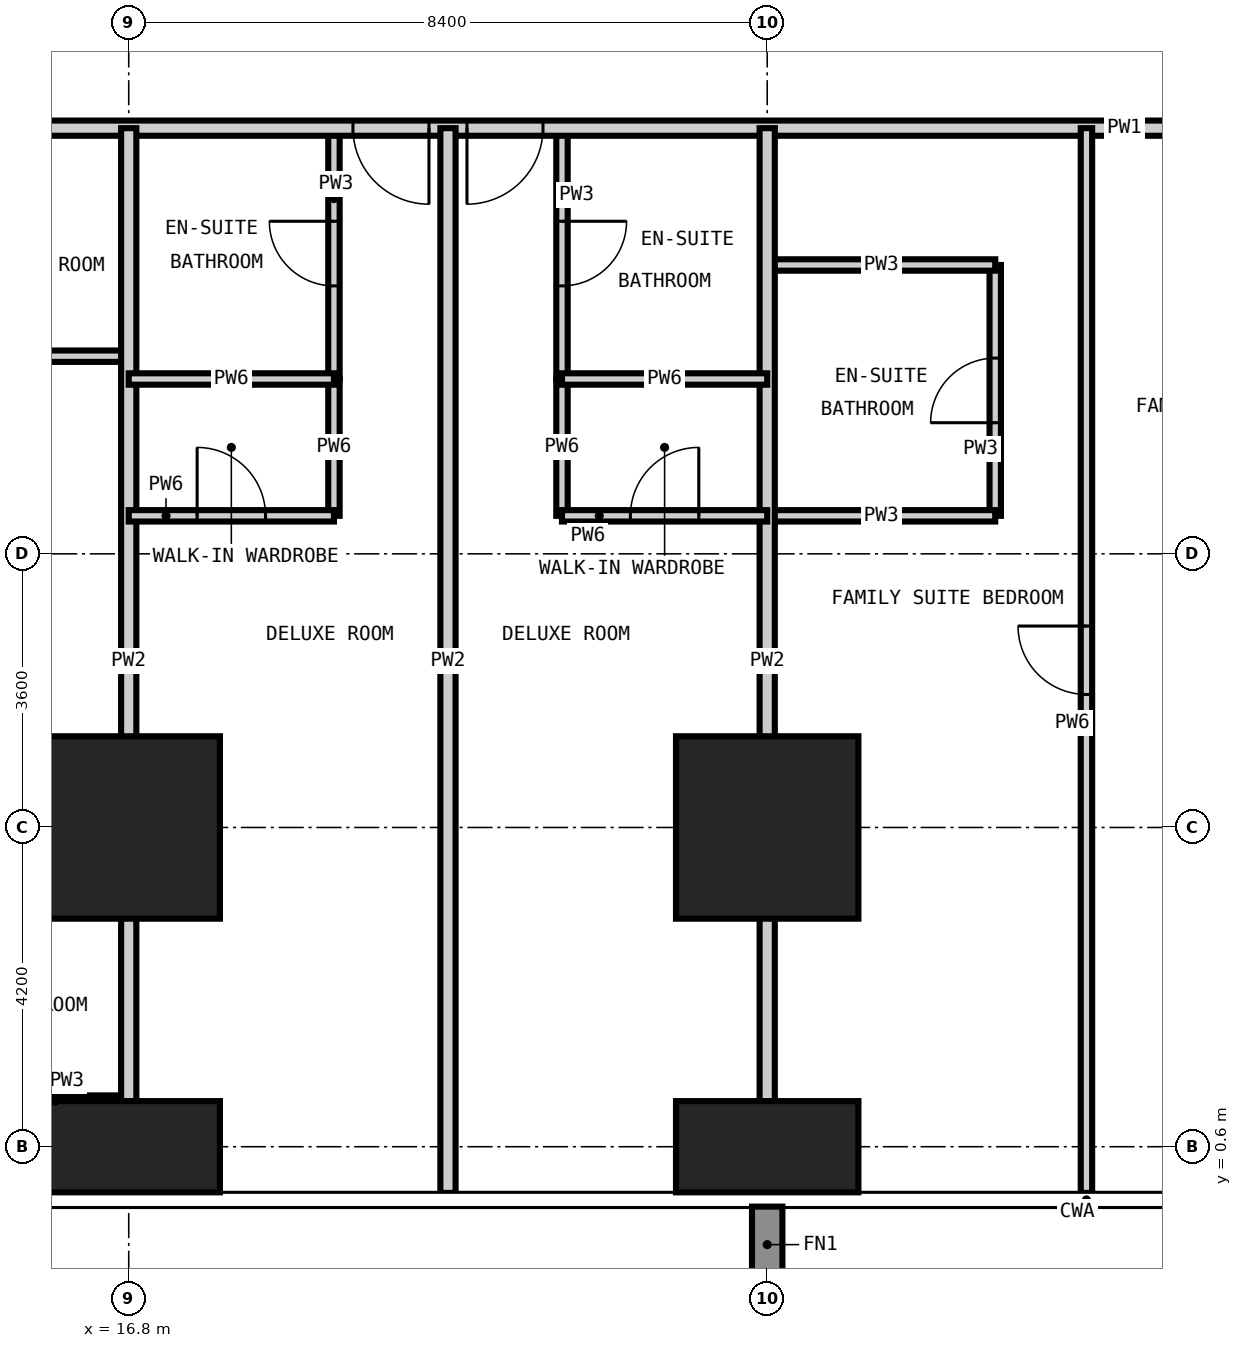
"""IFC4 building model, lengths in metres.
Left out: names, types, materials, properties, quantities, classifications, styles, units other than length and angle.
Written with IfcOpenShell. Run it as: python <this file> out.ifc"""

import sys

from ifc_helpers import new_model, si_unit, direction, frame, frame_2d, origin, origin_2d, place, context, subcontext, project, spatial, rectangle, extrude, element, fill, save


model = new_model("IFC4")
c1 = context("Model", 3, precision=1e-05, world=origin(), true_north=direction((0.0, 1.0)))
c2 = subcontext(c1, "Body", "Model", "MODEL_VIEW")
j1 = project(units=[si_unit("LENGTHUNIT", "METRE"), si_unit("PLANEANGLEUNIT", "RADIAN")], contexts=[c1])
p1 = place(None, origin())
s1 = spatial("IfcSite", under=j1, at=p1, CompositionType="ELEMENT")
p2 = place(p1, origin())
s2 = spatial("IfcBuilding", under=s1, at=p2, CompositionType="ELEMENT")
p3 = place(p2, frame((0.0, 0.0, 81.0)))
s3 = spatial("IfcBuildingStorey", under=s2, at=p3, CompositionType="ELEMENT", Elevation=81.0)
p4 = place(p3, frame((16.8, 0.6, -0.35), z_axis=(0.0, 0.0, 1.0), x_axis=(1.0, 0.0, 0.0)))
e1 = element("IfcColumn", 1, at=p4, inside=s3, PredefinedType="COLUMN", context=c2, shape_type="SweptSolid", body=[
    extrude(rectangle(XDim=2.4, YDim=1.2, at=origin_2d()), origin(), (0.0, 0.0, 1.0), 3.6),
])
p5 = place(p3, frame((16.8, 4.8, -0.35), z_axis=(0.0, 0.0, 1.0), x_axis=(1.0, 0.0, 0.0)))
e2 = element("IfcColumn", 2, at=p5, inside=s3, PredefinedType="COLUMN", context=c2, shape_type="SweptSolid", body=[
    extrude(rectangle(XDim=2.4, YDim=2.4, at=origin_2d()), origin(), (0.0, 0.0, 1.0), 3.6),
])
p6 = place(p3, frame((25.2, 0.6, -0.35), z_axis=(0.0, 0.0, 1.0), x_axis=(1.0, 0.0, 0.0)))
e3 = element("IfcColumn", 3, at=p6, inside=s3, PredefinedType="COLUMN", context=c2, shape_type="SweptSolid", body=[
    extrude(rectangle(XDim=2.4, YDim=1.2, at=origin_2d()), origin(), (0.0, 0.0, 1.0), 3.6),
])
p7 = place(p3, frame((25.2, 4.8, -0.35), z_axis=(0.0, 0.0, 1.0), x_axis=(1.0, 0.0, 0.0)))
e4 = element("IfcColumn", 4, at=p7, inside=s3, PredefinedType="COLUMN", context=c2, shape_type="SweptSolid", body=[
    extrude(rectangle(XDim=2.4, YDim=2.4, at=origin_2d()), origin(), (0.0, 0.0, 1.0), 3.6),
])
p8 = place(p3, frame((19.5, 10.7, 0.0), z_axis=(0.0, 0.0, 1.0), x_axis=(0.0, 1.0, 0.0)))
e5 = element("IfcWall", 5, at=p8, inside=s3, PredefinedType="PARTITIONING", context=c2, shape_type="SweptSolid", body=[
    extrude(rectangle(XDim=3.3, YDim=0.15, at=frame_2d((1.65, 0.0))), origin(), (0.0, 0.0, 1.0), 3.25),
])
p9 = place(p8, frame((1.225, 0.0, 0.0)))
e6 = element("IfcOpeningElement", 6, at=p9, cuts=e5, PredefinedType="OPENING", context=c2, shape_type="SweptSolid", body=[
    extrude(rectangle(XDim=0.85, YDim=2.1, at=frame_2d((0.425, 1.05))), frame((0.0, 0.085, 0.0), z_axis=(0.0, -1.0, 0.0), x_axis=(1.0, 0.0, 0.0)), (0.0, 0.0, 1.0), 0.17),
])
p10 = place(p3, frame((22.5, 10.7, 0.0), z_axis=(0.0, 0.0, 1.0), x_axis=(0.0, 1.0, 0.0)))
e7 = element("IfcWall", 7, at=p10, inside=s3, PredefinedType="PARTITIONING", context=c2, shape_type="SweptSolid", body=[
    extrude(rectangle(XDim=3.3, YDim=0.15, at=frame_2d((1.65, 0.0))), origin(), (0.0, 0.0, 1.0), 3.25),
])
p11 = place(p10, frame((1.225, 0.0, 0.0)))
e8 = element("IfcOpeningElement", 8, at=p11, cuts=e7, PredefinedType="OPENING", context=c2, shape_type="SweptSolid", body=[
    extrude(rectangle(XDim=0.85, YDim=2.1, at=frame_2d((0.425, 1.05))), frame((0.0, 0.085, 0.0), z_axis=(0.0, -1.0, 0.0), x_axis=(1.0, 0.0, 0.0)), (0.0, 0.0, 1.0), 0.17),
])
p12 = place(p3, frame((28.2, 8.9, 0.0), z_axis=(0.0, 0.0, 1.0), x_axis=(0.0, 1.0, 0.0)))
e9 = element("IfcWall", 9, at=p12, inside=s3, PredefinedType="PARTITIONING", context=c2, shape_type="SweptSolid", body=[
    extrude(rectangle(XDim=3.3, YDim=0.15, at=frame_2d((1.65, 0.0))), origin(), (0.0, 0.0, 1.0), 3.25),
])
p13 = place(p12, frame((1.225, 0.0, 0.0)))
e10 = element("IfcOpeningElement", 10, at=p13, cuts=e9, PredefinedType="OPENING", context=c2, shape_type="SweptSolid", body=[
    extrude(rectangle(XDim=0.85, YDim=2.1, at=frame_2d((0.425, 1.05))), frame((0.0, 0.085, 0.0), z_axis=(0.0, -1.0, 0.0), x_axis=(1.0, 0.0, 0.0)), (0.0, 0.0, 1.0), 0.17),
])
p14 = place(p3, frame((13.2, 1.2, 0.0), z_axis=(0.0, 0.0, 1.0), x_axis=(1.0, 0.0, 0.0)))
e11 = element("IfcWall", 11, at=p14, inside=s3, PredefinedType="PARTITIONING", context=c2, shape_type="SweptSolid", body=[
    extrude(rectangle(XDim=3.6, YDim=0.15, at=frame_2d((1.8, 0.0))), origin(), (0.0, 0.0, 1.0), 3.25),
])
p15 = place(p14, frame((1.375, 0.0, 0.0)))
e12 = element("IfcOpeningElement", 12, at=p15, cuts=e11, PredefinedType="OPENING", context=c2, shape_type="SweptSolid", body=[
    extrude(rectangle(XDim=0.85, YDim=2.1, at=frame_2d((0.425, 1.05))), frame((0.0, 0.085, 0.0), z_axis=(0.0, -1.0, 0.0), x_axis=(1.0, 0.0, 0.0)), (0.0, 0.0, 1.0), 0.17),
])
p16 = place(p3, frame((25.2, 8.9, 0.0), z_axis=(0.0, 0.0, 1.0), x_axis=(1.0, 0.0, 0.0)))
e13 = element("IfcWall", 13, at=p16, inside=s3, PredefinedType="PARTITIONING", context=c2, shape_type="SweptSolid", body=[
    extrude(rectangle(XDim=3.0, YDim=0.15, at=frame_2d((1.5, 0.0))), origin(), (0.0, 0.0, 1.0), 3.25),
])
p17 = place(p3, frame((14.0, 11.0, 0.0), z_axis=(0.0, 0.0, 1.0), x_axis=(1.0, 0.0, 0.0)))
e14 = element("IfcWall", 14, at=p17, inside=s3, PredefinedType="PARTITIONING", context=c2, shape_type="SweptSolid", body=[
    extrude(rectangle(XDim=2.8, YDim=0.15, at=frame_2d((1.4, 0.0))), origin(), (0.0, 0.0, 1.0), 3.25),
])
p18 = place(p3, frame((25.2, 12.2, 0.0), z_axis=(0.0, 0.0, 1.0), x_axis=(1.0, 0.0, 0.0)))
e15 = element("IfcWall", 15, at=p18, inside=s3, PredefinedType="PARTITIONING", context=c2, shape_type="SweptSolid", body=[
    extrude(rectangle(XDim=3.0, YDim=0.15, at=frame_2d((1.5, 0.0))), origin(), (0.0, 0.0, 1.0), 3.25),
])
p19 = place(p3, frame((45.4, 14.0, 0.0), z_axis=(0.0, 0.0, 1.0), x_axis=(-1.0, 0.0, 0.0)))
e16 = element("IfcWall", 16, at=p19, inside=s3, PredefinedType="PARTITIONING", context=c2, shape_type="SweptSolid", body=[
    extrude(rectangle(XDim=31.4, YDim=0.2, at=frame_2d((15.7, 0.0))), origin(), (0.0, 0.0, 1.0), 3.25),
])
p20 = place(p19, frame((24.65, 0.0, 0.0)))
e17 = element("IfcOpeningElement", 17, at=p20, cuts=e16, PredefinedType="OPENING", context=c2, shape_type="SweptSolid", body=[
    extrude(rectangle(XDim=1.0, YDim=2.2, at=frame_2d((0.5, 1.1))), frame((0.0, 0.11, 0.0), z_axis=(0.0, -1.0, 0.0), x_axis=(1.0, 0.0, 0.0)), (0.0, 0.0, 1.0), 0.22),
])
p21 = place(p19, frame((23.15, 0.0, 0.0)))
e18 = element("IfcOpeningElement", 18, at=p21, cuts=e16, PredefinedType="OPENING", context=c2, shape_type="SweptSolid", body=[
    extrude(rectangle(XDim=1.0, YDim=2.2, at=frame_2d((0.5, 1.1))), frame((0.0, 0.11, 0.0), z_axis=(0.0, -1.0, 0.0), x_axis=(1.0, 0.0, 0.0)), (0.0, 0.0, 1.0), 0.22),
])
p22 = place(p19, frame((13.4, 0.0, 0.0)))
e19 = element("IfcOpeningElement", 19, at=p22, cuts=e16, PredefinedType="OPENING", context=c2, shape_type="SweptSolid", body=[
    extrude(rectangle(XDim=1.0, YDim=2.2, at=frame_2d((0.5, 1.1))), frame((0.0, 0.11, 0.0), z_axis=(0.0, -1.0, 0.0), x_axis=(1.0, 0.0, 0.0)), (0.0, 0.0, 1.0), 0.22),
])
p23 = place(p19, frame((6.35, 0.0, 0.0)))
e20 = element("IfcOpeningElement", 20, at=p23, cuts=e16, PredefinedType="OPENING", context=c2, shape_type="SweptSolid", body=[
    extrude(rectangle(XDim=1.0, YDim=2.2, at=frame_2d((0.5, 1.1))), frame((0.0, 0.11, 0.0), z_axis=(0.0, -1.0, 0.0), x_axis=(1.0, 0.0, 0.0)), (0.0, 0.0, 1.0), 0.22),
])
for number, where, z_axis, x_axis in (
    (21, (16.8, -0.008, 0.0), (0.0, 0.0, 1.0), (0.0, 1.0, 0.0)),
    (22, (21.0, -0.008, 0.0), (0.0, 0.0, 1.0), (0.0, 1.0, 0.0)),
    (23, (25.2, -0.008, 0.0), (0.0, 0.0, 1.0), (0.0, 1.0, 0.0)),
):
    element("IfcWall", number, at=place(p3, frame(where, z_axis=z_axis, x_axis=x_axis)), inside=s3, PredefinedType="PARTITIONING", context=c2, shape_type="SweptSolid", body=[
        extrude(rectangle(XDim=14.008, YDim=0.2, at=frame_2d((7.004, 0.0))), origin(), (0.0, 0.0, 1.0), 3.25),
    ])
for number, where, z_axis, x_axis in (
    (24, (19.5, 8.9, 0.0), (0.0, 0.0, 1.0), (0.0, 1.0, 0.0)),
    (25, (22.5, 8.9, 0.0), (0.0, 0.0, 1.0), (0.0, 1.0, 0.0)),
):
    element("IfcWall", number, at=place(p3, frame(where, z_axis=z_axis, x_axis=x_axis)), inside=s3, PredefinedType="PARTITIONING", context=c2, shape_type="SweptSolid", body=[
        extrude(rectangle(XDim=1.8, YDim=0.15, at=frame_2d((0.9, 0.0))), origin(), (0.0, 0.0, 1.0), 3.25),
    ])
p24 = place(p3, frame((29.4, -0.008, 0.0), z_axis=(0.0, 0.0, 1.0), x_axis=(0.0, 1.0, 0.0)))
e26 = element("IfcWall", 26, at=p24, inside=s3, PredefinedType="PARTITIONING", context=c2, shape_type="SweptSolid", body=[
    extrude(rectangle(XDim=14.008, YDim=0.15, at=frame_2d((7.004, 0.0))), origin(), (0.0, 0.0, 1.0), 3.25),
])
p25 = place(p24, frame((6.558, 0.0, 0.0)))
e27 = element("IfcOpeningElement", 27, at=p25, cuts=e26, PredefinedType="OPENING", context=c2, shape_type="SweptSolid", body=[
    extrude(rectangle(XDim=0.9, YDim=2.1, at=frame_2d((0.45, 1.05))), frame((0.0, 0.085, 0.0), z_axis=(0.0, -1.0, 0.0), x_axis=(1.0, 0.0, 0.0)), (0.0, 0.0, 1.0), 0.17),
])
p26 = place(p3, frame((-0.008, 4.2, 0.0), z_axis=(0.0, 0.0, 1.0), x_axis=(1.0, 0.0, 0.0)))
e28 = element("IfcWall", 28, at=p26, inside=s3, PredefinedType="PARTITIONING", context=c2, shape_type="SweptSolid", body=[
    extrude(rectangle(XDim=16.808, YDim=0.15, at=frame_2d((8.404, 0.0))), origin(), (0.0, 0.0, 1.0), 3.25),
])
p27 = place(p26, frame((4.958, 0.0, 0.0)))
e29 = element("IfcOpeningElement", 29, at=p27, cuts=e28, PredefinedType="OPENING", context=c2, shape_type="SweptSolid", body=[
    extrude(rectangle(XDim=0.9, YDim=2.1, at=frame_2d((0.45, 1.05))), frame((0.0, 0.085, 0.0), z_axis=(0.0, -1.0, 0.0), x_axis=(1.0, 0.0, 0.0)), (0.0, 0.0, 1.0), 0.17),
])
p28 = place(p3, frame((16.8, 8.9, 0.0), z_axis=(0.0, 0.0, 1.0), x_axis=(1.0, 0.0, 0.0)))
e30 = element("IfcWall", 30, at=p28, inside=s3, PredefinedType="PARTITIONING", context=c2, shape_type="SweptSolid", body=[
    extrude(rectangle(XDim=2.7, YDim=0.15, at=frame_2d((1.35, 0.0))), origin(), (0.0, 0.0, 1.0), 3.25),
])
p29 = place(p28, frame((0.9, 0.0, 0.0)))
e31 = element("IfcOpeningElement", 31, at=p29, cuts=e30, PredefinedType="OPENING", context=c2, shape_type="SweptSolid", body=[
    extrude(rectangle(XDim=0.9, YDim=2.1, at=frame_2d((0.45, 1.05))), frame((0.0, 0.085, 0.0), z_axis=(0.0, -1.0, 0.0), x_axis=(1.0, 0.0, 0.0)), (0.0, 0.0, 1.0), 0.17),
])
p30 = place(p3, frame((22.5, 8.9, 0.0), z_axis=(0.0, 0.0, 1.0), x_axis=(1.0, 0.0, 0.0)))
e32 = element("IfcWall", 32, at=p30, inside=s3, PredefinedType="PARTITIONING", context=c2, shape_type="SweptSolid", body=[
    extrude(rectangle(XDim=2.7, YDim=0.15, at=frame_2d((1.35, 0.0))), origin(), (0.0, 0.0, 1.0), 3.25),
])
p31 = place(p30, frame((0.9, 0.0, 0.0)))
e33 = element("IfcOpeningElement", 33, at=p31, cuts=e32, PredefinedType="OPENING", context=c2, shape_type="SweptSolid", body=[
    extrude(rectangle(XDim=0.9, YDim=2.1, at=frame_2d((0.45, 1.05))), frame((0.0, 0.085, 0.0), z_axis=(0.0, -1.0, 0.0), x_axis=(1.0, 0.0, 0.0)), (0.0, 0.0, 1.0), 0.17),
])
for number, where, z_axis, x_axis in (
    (34, (16.8, 10.7, 0.0), (0.0, 0.0, 1.0), (1.0, 0.0, 0.0)),
    (35, (22.5, 10.7, 0.0), (0.0, 0.0, 1.0), (1.0, 0.0, 0.0)),
):
    element("IfcWall", number, at=place(p3, frame(where, z_axis=z_axis, x_axis=x_axis)), inside=s3, PredefinedType="PARTITIONING", context=c2, shape_type="SweptSolid", body=[
        extrude(rectangle(XDim=2.7, YDim=0.15, at=frame_2d((1.35, 0.0))), origin(), (0.0, 0.0, 1.0), 3.25),
    ])
p32 = place(p20, origin())
e36 = element("IfcDoor", 36, at=p32, inside=s3, OperationType="SINGLE_SWING_LEFT", PredefinedType="DOOR", context=c2, shape_type="SweptSolid", body=[
    extrude(rectangle(XDim=1.0, YDim=2.2, at=frame_2d((0.5, 1.1))), frame((0.0, 0.025, 0.0), z_axis=(0.0, -1.0, 0.0), x_axis=(1.0, 0.0, 0.0)), (0.0, 0.0, 1.0), 0.05),
])
fill(e17, e36)
p33 = place(p9, origin())
e37 = element("IfcDoor", 37, at=p33, inside=s3, OperationType="SINGLE_SWING_RIGHT", PredefinedType="DOOR", context=c2, shape_type="SweptSolid", body=[
    extrude(rectangle(XDim=0.85, YDim=2.1, at=frame_2d((0.425, 1.05))), frame((0.0, 0.025, 0.0), z_axis=(0.0, -1.0, 0.0), x_axis=(1.0, 0.0, 0.0)), (0.0, 0.0, 1.0), 0.05),
])
fill(e6, e37)
p34 = place(p29, origin())
e38 = element("IfcDoor", 38, at=p34, inside=s3, OperationType="SINGLE_SWING_LEFT", PredefinedType="DOOR", context=c2, shape_type="SweptSolid", body=[
    extrude(rectangle(XDim=0.9, YDim=2.1, at=frame_2d((0.45, 1.05))), frame((0.0, 0.025, 0.0), z_axis=(0.0, -1.0, 0.0), x_axis=(1.0, 0.0, 0.0)), (0.0, 0.0, 1.0), 0.05),
])
fill(e31, e38)
p35 = place(p21, origin())
e39 = element("IfcDoor", 39, at=p35, inside=s3, OperationType="SINGLE_SWING_RIGHT", PredefinedType="DOOR", context=c2, shape_type="SweptSolid", body=[
    extrude(rectangle(XDim=1.0, YDim=2.2, at=frame_2d((0.5, 1.1))), frame((0.0, 0.025, 0.0), z_axis=(0.0, -1.0, 0.0), x_axis=(1.0, 0.0, 0.0)), (0.0, 0.0, 1.0), 0.05),
])
fill(e18, e39)
p36 = place(p11, frame((0.85, 0.0, 0.0), z_axis=(0.0, 0.0, 1.0), x_axis=(-1.0, 0.0, 0.0)))
e40 = element("IfcDoor", 40, at=p36, inside=s3, OperationType="SINGLE_SWING_LEFT", PredefinedType="DOOR", context=c2, shape_type="SweptSolid", body=[
    extrude(rectangle(XDim=0.85, YDim=2.1, at=frame_2d((0.425, 1.05))), frame((0.0, 0.025, 0.0), z_axis=(0.0, -1.0, 0.0), x_axis=(1.0, 0.0, 0.0)), (0.0, 0.0, 1.0), 0.05),
])
fill(e8, e40)
p37 = place(p31, origin())
e41 = element("IfcDoor", 41, at=p37, inside=s3, OperationType="SINGLE_SWING_RIGHT", PredefinedType="DOOR", context=c2, shape_type="SweptSolid", body=[
    extrude(rectangle(XDim=0.9, YDim=2.1, at=frame_2d((0.45, 1.05))), frame((0.0, 0.025, 0.0), z_axis=(0.0, -1.0, 0.0), x_axis=(1.0, 0.0, 0.0)), (0.0, 0.0, 1.0), 0.05),
])
fill(e33, e41)
p38 = place(p25, origin())
e42 = element("IfcDoor", 42, at=p38, inside=s3, OperationType="SINGLE_SWING_RIGHT", PredefinedType="DOOR", context=c2, shape_type="SweptSolid", body=[
    extrude(rectangle(XDim=0.9, YDim=2.1, at=frame_2d((0.45, 1.05))), frame((0.0, 0.025, 0.0), z_axis=(0.0, -1.0, 0.0), x_axis=(1.0, 0.0, 0.0)), (0.0, 0.0, 1.0), 0.05),
])
fill(e27, e42)
p39 = place(p13, origin())
e43 = element("IfcDoor", 43, at=p39, inside=s3, OperationType="SINGLE_SWING_LEFT", PredefinedType="DOOR", context=c2, shape_type="SweptSolid", body=[
    extrude(rectangle(XDim=0.85, YDim=2.1, at=frame_2d((0.425, 1.05))), frame((0.0, 0.025, 0.0), z_axis=(0.0, -1.0, 0.0), x_axis=(1.0, 0.0, 0.0)), (0.0, 0.0, 1.0), 0.05),
])
fill(e10, e43)
save(model, sys.argv[1])
